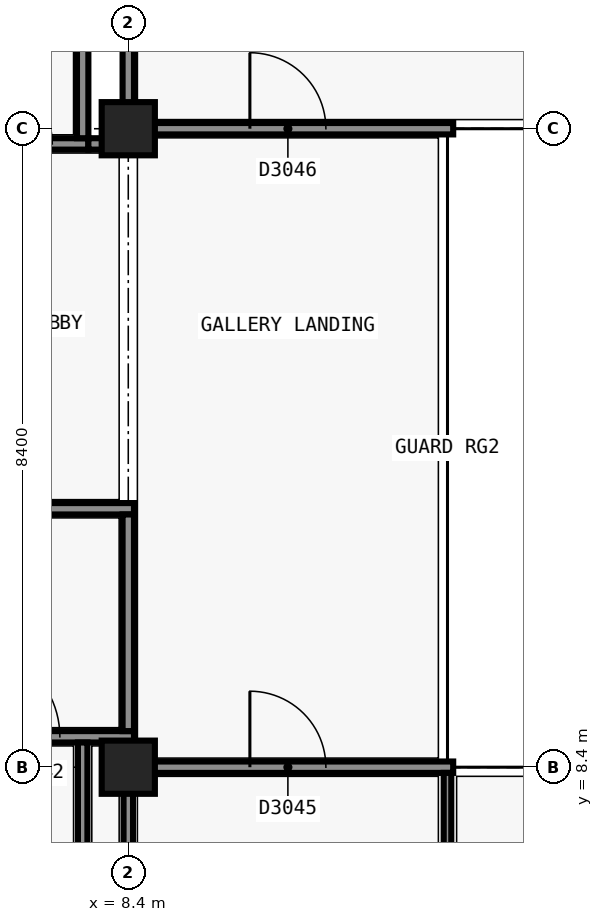
"""IFC4 building model, lengths in metres.
Left out: names, types, materials, properties, quantities, classifications, styles, units other than length and angle.
Written with IfcOpenShell. Run it as: python <this file> out.ifc"""

import sys

from ifc_helpers import new_model, si_unit, direction, frame, frame_2d, origin, origin_2d, place, context, subcontext, project, spatial, rectangle, extrude, element, fill, save


model = new_model("IFC4")
c1 = context("Model", 3, precision=1e-05, world=origin(), true_north=direction((0.0, 1.0)))
c2 = subcontext(c1, "Body", "Model", "MODEL_VIEW")
j1 = project(units=[si_unit("LENGTHUNIT", "METRE"), si_unit("PLANEANGLEUNIT", "RADIAN")], contexts=[c1])
p1 = place(None, origin())
s1 = spatial("IfcSite", under=j1, at=p1, CompositionType="ELEMENT")
p2 = place(p1, origin())
s2 = spatial("IfcBuilding", under=s1, at=p2, CompositionType="ELEMENT")
p3 = place(p2, frame((0.0, 0.0, 15.0)))
s3 = spatial("IfcBuildingStorey", under=s2, at=p3, CompositionType="ELEMENT", Elevation=15.0)
for number, where, z_axis, x_axis in (
    (1, (8.4, 8.4, 0.0), (0.0, 0.0, 1.0), (1.0, 0.0, 0.0)),
    (2, (8.4, 16.8, 0.0), (0.0, 0.0, 1.0), (1.0, 0.0, 0.0)),
):
    element("IfcColumn", number, at=place(p3, frame(where, z_axis=z_axis, x_axis=x_axis)), inside=s3, PredefinedType="COLUMN", context=c2, shape_type="SweptSolid", body=[
        extrude(rectangle(XDim=0.7, YDim=0.7, at=origin_2d()), origin(), (0.0, 0.0, 1.0), 4.8),
    ])
p4 = place(p3, frame((8.325, 8.4, 0.0), z_axis=(0.0, 0.0, 1.0), x_axis=(1.0, 0.0, 0.0)))
e3 = element("IfcWall", 3, at=p4, inside=s3, PredefinedType="PARTITIONING", context=c2, shape_type="SweptSolid", body=[
    extrude(rectangle(XDim=4.35, YDim=0.15, at=frame_2d((2.175, 0.0))), origin(), (0.0, 0.0, 1.0), 3.8),
])
p5 = place(p4, frame((1.675, 0.0, 0.0)))
e4 = element("IfcOpeningElement", 4, at=p5, cuts=e3, PredefinedType="OPENING", context=c2, shape_type="SweptSolid", body=[
    extrude(rectangle(XDim=1.0, YDim=2.1, at=frame_2d((0.5, 1.05))), frame((0.0, 0.085, 0.0), z_axis=(0.0, -1.0, 0.0), x_axis=(1.0, 0.0, 0.0)), (0.0, 0.0, 1.0), 0.17),
])
p6 = place(p3, frame((6.1, 16.6, 0.0), z_axis=(0.0, 0.0, 1.0), x_axis=(1.0, 0.0, 0.0)))
e5 = element("IfcWall", 5, at=p6, inside=s3, PredefinedType="PARTITIONING", context=c2, shape_type="SweptSolid", body=[
    extrude(rectangle(XDim=1.775, YDim=0.15, at=frame_2d((0.887, 0.0))), origin(), (0.0, 0.0, 1.0), 4.0),
])
p7 = place(p6, frame((0.3, 0.0, 0.0)))
e6 = element("IfcOpeningElement", 6, at=p7, cuts=e5, PredefinedType="OPENING", context=c2, shape_type="SweptSolid", body=[
    extrude(rectangle(XDim=1.0, YDim=2.1, at=frame_2d((0.5, 1.05))), frame((0.0, 0.085, 0.0), z_axis=(0.0, -1.0, 0.0), x_axis=(1.0, 0.0, 0.0)), (0.0, 0.0, 1.0), 0.17),
])
p8 = place(p3, frame((8.325, 16.8, 0.0), z_axis=(0.0, 0.0, 1.0), x_axis=(1.0, 0.0, 0.0)))
e7 = element("IfcWall", 7, at=p8, inside=s3, PredefinedType="PARTITIONING", context=c2, shape_type="SweptSolid", body=[
    extrude(rectangle(XDim=4.35, YDim=0.15, at=frame_2d((2.175, 0.0))), origin(), (0.0, 0.0, 1.0), 3.8),
])
p9 = place(p8, frame((1.675, 0.0, 0.0)))
e8 = element("IfcOpeningElement", 8, at=p9, cuts=e7, PredefinedType="OPENING", context=c2, shape_type="SweptSolid", body=[
    extrude(rectangle(XDim=1.0, YDim=2.1, at=frame_2d((0.5, 1.05))), frame((0.0, 0.085, 0.0), z_axis=(0.0, -1.0, 0.0), x_axis=(1.0, 0.0, 0.0)), (0.0, 0.0, 1.0), 0.17),
])
p10 = place(p3, frame((6.1, 8.8, 0.0), z_axis=(0.0, 0.0, 1.0), x_axis=(1.0, 0.0, 0.0)))
e9 = element("IfcWall", 9, at=p10, inside=s3, PredefinedType="SOLIDWALL", context=c2, shape_type="SweptSolid", body=[
    extrude(rectangle(XDim=2.375, YDim=0.15, at=frame_2d((1.188, 0.0))), origin(), (0.0, 0.0, 1.0), 3.8),
])
p11 = place(p10, frame((0.2, 0.0, 0.0)))
e10 = element("IfcOpeningElement", 10, at=p11, cuts=e9, PredefinedType="OPENING", context=c2, shape_type="SweptSolid", body=[
    extrude(rectangle(XDim=1.2, YDim=2.1, at=frame_2d((0.6, 1.05))), frame((0.0, 0.085, 0.0), z_axis=(0.0, -1.0, 0.0), x_axis=(1.0, 0.0, 0.0)), (0.0, 0.0, 1.0), 0.17),
])
p12 = place(p3, frame((3.3, 11.8, 0.0), z_axis=(0.0, 0.0, 1.0), x_axis=(1.0, 0.0, 0.0)))
e11 = element("IfcWall", 11, at=p12, inside=s3, PredefinedType="SOLIDWALL", context=c2, shape_type="SweptSolid", body=[
    extrude(rectangle(XDim=5.175, YDim=0.15, at=frame_2d((2.587, 0.0))), origin(), (0.0, 0.0, 1.0), 3.8),
])
p13 = place(p3, frame((7.875, 16.6, 0.0), z_axis=(0.0, 0.0, 1.0), x_axis=(1.0, 0.0, 0.0)))
e12 = element("IfcWall", 12, at=p13, inside=s3, PredefinedType="SOLIDWALL", context=c2, shape_type="SweptSolid", body=[
    extrude(rectangle(XDim=0.6, YDim=0.15, at=frame_2d((0.3, 0.0))), origin(), (0.0, 0.0, 1.0), 3.8),
])
p14 = place(p3, frame((8.4, 8.475, 0.0), z_axis=(0.0, 0.0, 1.0), x_axis=(0.0, 1.0, 0.0)))
e13 = element("IfcWall", 13, at=p14, inside=s3, PredefinedType="PARTITIONING", context=c2, shape_type="SweptSolid", body=[
    extrude(rectangle(XDim=0.25, YDim=0.15, at=frame_2d((0.125, 0.0))), origin(), (0.0, 0.0, 1.0), 3.8),
])
p15 = place(p3, frame((8.4, 8.875, 0.0), z_axis=(0.0, 0.0, 1.0), x_axis=(0.0, 1.0, 0.0)))
e14 = element("IfcWall", 14, at=p15, inside=s3, PredefinedType="SOLIDWALL", context=c2, shape_type="SweptSolid", body=[
    extrude(rectangle(XDim=2.85, YDim=0.15, at=frame_2d((1.425, 0.0))), origin(), (0.0, 0.0, 1.0), 3.8),
])
p16 = place(p3, frame((7.8, 16.675, 0.0), z_axis=(0.0, 0.0, 1.0), x_axis=(0.0, 1.0, 0.0)))
e15 = element("IfcWall", 15, at=p16, inside=s3, PredefinedType="SOLIDWALL", context=c2, shape_type="SweptSolid", body=[
    extrude(rectangle(XDim=1.65, YDim=0.15, at=frame_2d((0.825, 0.0))), origin(), (0.0, 0.0, 1.0), 4.0),
])
p17 = place(p3, frame((8.4, 16.875, 0.0), z_axis=(0.0, 0.0, 1.0), x_axis=(0.0, 1.0, 0.0)))
e16 = element("IfcWall", 16, at=p17, inside=s3, PredefinedType="SOLIDWALL", context=c2, shape_type="SweptSolid", body=[
    extrude(rectangle(XDim=7.575, YDim=0.15, at=frame_2d((3.788, 0.0))), origin(), (0.0, 0.0, 1.0), 3.8),
])
p18 = place(p3, frame((7.8, 7.062, 0.0), z_axis=(0.0, 0.0, 1.0), x_axis=(0.0, 1.0, 0.0)))
e17 = element("IfcWall", 17, at=p18, inside=s3, PredefinedType="PARTITIONING", context=c2, shape_type="SweptSolid", body=[
    extrude(rectangle(XDim=1.663, YDim=0.125, at=frame_2d((0.831, 0.0))), origin(), (0.0, 0.0, 1.0), 4.0),
])
p19 = place(p3, frame((8.4, 0.75, 0.0), z_axis=(0.0, 0.0, 1.0), x_axis=(0.0, 1.0, 0.0)))
e18 = element("IfcWall", 18, at=p19, inside=s3, PredefinedType="PARTITIONING", context=c2, shape_type="SweptSolid", body=[
    extrude(rectangle(XDim=7.575, YDim=0.125, at=frame_2d((3.788, 0.0))), origin(), (0.0, 0.0, 1.0), 3.8),
])
p20 = place(p3, frame((12.6, 0.75, 0.0), z_axis=(0.0, 0.0, 1.0), x_axis=(0.0, 1.0, 0.0)))
e19 = element("IfcWall", 19, at=p20, inside=s3, PredefinedType="PARTITIONING", context=c2, shape_type="SweptSolid", body=[
    extrude(rectangle(XDim=7.575, YDim=0.1, at=frame_2d((3.788, 0.0))), origin(), (0.0, 0.0, 1.0), 3.8),
])
p21 = place(p20, frame((2.95, 0.0, 0.0)))
e20 = element("IfcOpeningElement", 20, at=p21, cuts=e19, PredefinedType="OPENING", context=c2, shape_type="SweptSolid", body=[
    extrude(rectangle(XDim=1.0, YDim=2.1, at=frame_2d((0.5, 1.05))), frame((0.0, 0.06, 0.0), z_axis=(0.0, -1.0, 0.0), x_axis=(1.0, 0.0, 0.0)), (0.0, 0.0, 1.0), 0.12),
])
p22 = place(p11, origin())
e21 = element("IfcDoor", 21, at=p22, inside=s3, OperationType="SINGLE_SWING_RIGHT", PredefinedType="DOOR", context=c2, shape_type="SweptSolid", body=[
    extrude(rectangle(XDim=1.2, YDim=2.1, at=frame_2d((0.6, 1.05))), frame((0.0, 0.025, 0.0), z_axis=(0.0, -1.0, 0.0), x_axis=(1.0, 0.0, 0.0)), (0.0, 0.0, 1.0), 0.05),
])
fill(e10, e21)
p23 = place(p7, origin())
e22 = element("IfcDoor", 22, at=p23, inside=s3, OperationType="SINGLE_SWING_RIGHT", PredefinedType="DOOR", context=c2, shape_type="SweptSolid", body=[
    extrude(rectangle(XDim=1.0, YDim=2.1, at=frame_2d((0.5, 1.05))), frame((0.0, 0.025, 0.0), z_axis=(0.0, -1.0, 0.0), x_axis=(1.0, 0.0, 0.0)), (0.0, 0.0, 1.0), 0.05),
])
fill(e6, e22)
p24 = place(p5, origin())
e23 = element("IfcDoor", 23, at=p24, inside=s3, OperationType="SINGLE_SWING_RIGHT", PredefinedType="DOOR", context=c2, shape_type="SweptSolid", body=[
    extrude(rectangle(XDim=1.0, YDim=2.1, at=frame_2d((0.5, 1.05))), frame((0.0, 0.025, 0.0), z_axis=(0.0, -1.0, 0.0), x_axis=(1.0, 0.0, 0.0)), (0.0, 0.0, 1.0), 0.05),
])
fill(e4, e23)
p25 = place(p9, origin())
e24 = element("IfcDoor", 24, at=p25, inside=s3, OperationType="SINGLE_SWING_RIGHT", PredefinedType="DOOR", context=c2, shape_type="SweptSolid", body=[
    extrude(rectangle(XDim=1.0, YDim=2.1, at=frame_2d((0.5, 1.05))), frame((0.0, 0.025, 0.0), z_axis=(0.0, -1.0, 0.0), x_axis=(1.0, 0.0, 0.0)), (0.0, 0.0, 1.0), 0.05),
])
fill(e8, e24)
save(model, sys.argv[1])
